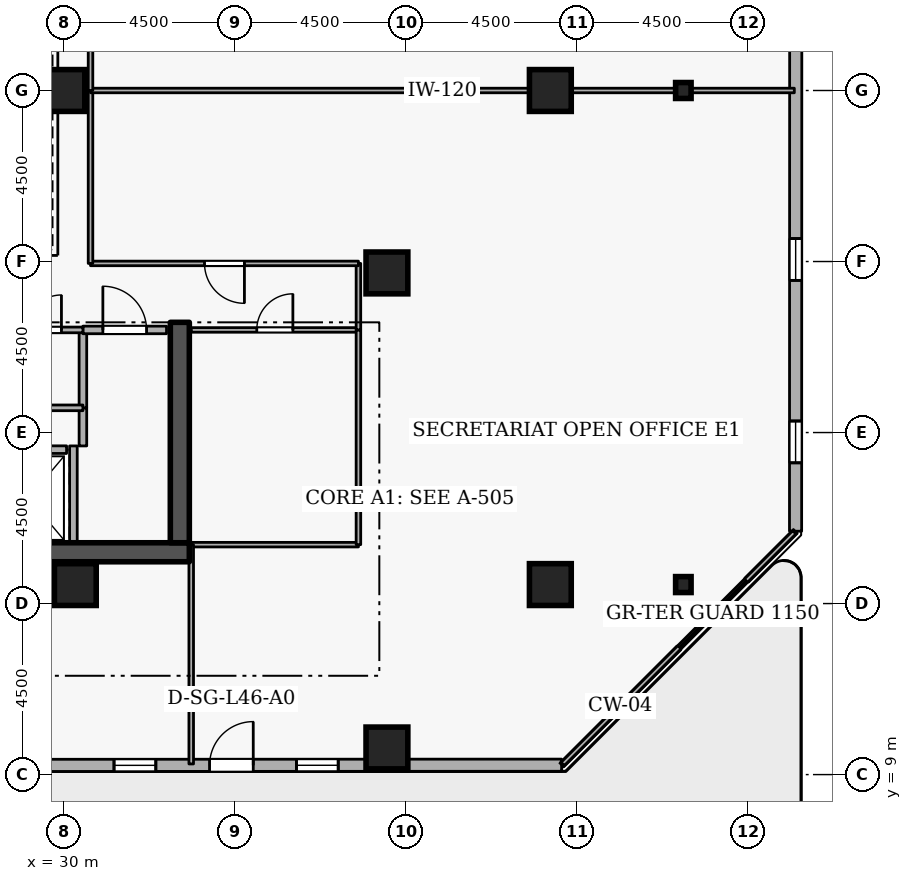
"""IFC4 building model, lengths in metres.
Left out: names, types, materials, properties, quantities, classifications, styles, units other than length and angle.
Written with IfcOpenShell. Run it as: python <this file> out.ifc"""

import sys

from ifc_helpers import new_model, si_unit, direction, frame, frame_2d, origin, origin_2d, place, context, subcontext, project, spatial, rectangle, i_section, extrude, element, fill, save


model = new_model("IFC4")
c1 = context("Model", 3, precision=1e-05, world=origin(), true_north=direction((0.0, 1.0)))
c2 = subcontext(c1, "Body", "Model", "MODEL_VIEW")
j1 = project(units=[si_unit("LENGTHUNIT", "METRE"), si_unit("PLANEANGLEUNIT", "RADIAN")], contexts=[c1])
p1 = place(None, origin())
s1 = spatial("IfcSite", under=j1, at=p1, CompositionType="ELEMENT")
p2 = place(p1, origin())
s2 = spatial("IfcBuilding", under=s1, at=p2, CompositionType="ELEMENT")
p3 = place(p2, frame((0.0, 0.0, 174.3)))
s3 = spatial("IfcBuildingStorey", under=s2, at=p3, CompositionType="ELEMENT", Elevation=174.3)
p4 = place(p3, frame((17.7, 14.85, 0.0), z_axis=(0.0, 0.0, 1.0), x_axis=(1.0, 0.0, 0.0)))
e1 = element("IfcWall", 1, at=p4, inside=s3, PredefinedType="SHEAR", context=c2, shape_type="SweptSolid", body=[
    extrude(rectangle(XDim=15.6, YDim=0.5, at=frame_2d((7.8, 0.0))), origin(), (0.0, 0.0, 1.0), 4.2),
])
p5 = place(p3, frame((33.05, 15.1, 0.0), z_axis=(0.0, 0.0, 1.0), x_axis=(0.0, 1.0, 0.0)))
e2 = element("IfcWall", 2, at=p5, inside=s3, PredefinedType="SHEAR", context=c2, shape_type="SweptSolid", body=[
    extrude(rectangle(XDim=5.8, YDim=0.5, at=frame_2d((2.9, 0.0))), origin(), (0.0, 0.0, 1.0), 4.2),
])
for number, where, z_axis, x_axis in (
    (3, (38.5, 9.7, 0.0), (0.0, 0.0, 1.0), (1.0, 0.0, 0.0)),
    (4, (42.8, 14.0, 0.0), (0.0, 0.0, 1.0), (1.0, 0.0, 0.0)),
    (5, (42.8, 27.0, 0.0), (0.0, 0.0, 1.0), (1.0, 0.0, 0.0)),
    (6, (38.5, 22.2, 0.0), (0.0, 0.0, 1.0), (1.0, 0.0, 0.0)),
    (7, (30.3, 14.0, 0.0), (0.0, 0.0, 1.0), (1.0, 0.0, 0.0)),
    (8, (30.0, 27.0, 0.0), (0.0, 0.0, 1.0), (1.0, 0.0, 0.0)),
):
    element("IfcColumn", number, at=place(p3, frame(where, z_axis=z_axis, x_axis=x_axis)), inside=s3, PredefinedType="COLUMN", context=c2, shape_type="SweptSolid", body=[
        extrude(rectangle(XDim=1.1, YDim=1.1, at=origin_2d()), origin(), (0.0, 0.0, 1.0), 4.2),
    ])
for number, where, z_axis, x_axis in (
    (9, (46.3, 14.0, 0.0), (0.0, 0.0, 1.0), (1.0, 0.0, 0.0)),
    (10, (46.3, 27.0, 0.0), (0.0, 0.0, 1.0), (1.0, 0.0, 0.0)),
):
    element("IfcColumn", number, at=place(p3, frame(where, z_axis=z_axis, x_axis=x_axis)), inside=s3, PredefinedType="COLUMN", context=c2, shape_type="SweptSolid", body=[
        extrude(i_section(OverallWidth=0.407, OverallDepth=0.419, WebThickness=0.031, FlangeThickness=0.049, FilletRadius=0.015, at=origin_2d()), origin(), (0.0, 0.0, 1.0), 4.2),
    ])
p6 = place(p3, frame((10.319, 9.235, 0.0), z_axis=(0.0, 0.0, 1.0), x_axis=(0.999999933399, 0.000364968916, 0.0)))
e11 = element("IfcWall", 11, at=p6, inside=s3, PredefinedType="STANDARD", context=c2, shape_type="SweptSolid", body=[
    extrude(rectangle(XDim=32.778, YDim=0.32, at=frame_2d((16.389, 0.0))), origin(), (0.0, 0.0, 1.0), 3.3),
])
p7 = place(p6, frame((23.514, 0.0, 0.0)))
e12 = element("IfcOpeningElement", 12, at=p7, cuts=e11, PredefinedType="OPENING", context=c2, shape_type="SweptSolid", body=[
    extrude(rectangle(XDim=1.15, YDim=2.1, at=frame_2d((0.575, 1.05))), frame((0.0, 0.17, 0.0), z_axis=(0.0, -1.0, 0.0), x_axis=(1.0, 0.0, 0.0)), (0.0, 0.0, 1.0), 0.34),
])
p8 = place(p6, frame((6.6, 0.0, 0.72)))
e13 = element("IfcOpeningElement", 13, at=p8, cuts=e11, PredefinedType="OPENING", context=c2, shape_type="SweptSolid", body=[
    extrude(rectangle(XDim=1.1, YDim=1.8, at=frame_2d((0.55, 0.9))), frame((0.0, 0.17, 0.0), z_axis=(0.0, -1.0, 0.0), x_axis=(1.0, 0.0, 0.0)), (0.0, 0.0, 1.0), 0.34),
])
p9 = place(p6, frame((11.4, 0.0, 0.72)))
e14 = element("IfcOpeningElement", 14, at=p9, cuts=e11, PredefinedType="OPENING", context=c2, shape_type="SweptSolid", body=[
    extrude(rectangle(XDim=1.1, YDim=1.8, at=frame_2d((0.55, 0.9))), frame((0.0, 0.17, 0.0), z_axis=(0.0, -1.0, 0.0), x_axis=(1.0, 0.0, 0.0)), (0.0, 0.0, 1.0), 0.34),
])
p10 = place(p6, frame((21.0, 0.0, 0.72)))
e15 = element("IfcOpeningElement", 15, at=p10, cuts=e11, PredefinedType="OPENING", context=c2, shape_type="SweptSolid", body=[
    extrude(rectangle(XDim=1.1, YDim=1.8, at=frame_2d((0.55, 0.9))), frame((0.0, 0.17, 0.0), z_axis=(0.0, -1.0, 0.0), x_axis=(1.0, 0.0, 0.0)), (0.0, 0.0, 1.0), 0.34),
])
p11 = place(p6, frame((25.8, 0.0, 0.72)))
e16 = element("IfcOpeningElement", 16, at=p11, cuts=e11, PredefinedType="OPENING", context=c2, shape_type="SweptSolid", body=[
    extrude(rectangle(XDim=1.1, YDim=1.8, at=frame_2d((0.55, 0.9))), frame((0.0, 0.17, 0.0), z_axis=(0.0, -1.0, 0.0), x_axis=(1.0, 0.0, 0.0)), (0.0, 0.0, 1.0), 0.34),
])
p12 = place(p3, frame((49.253, 15.404, 0.0), z_axis=(0.0, 0.0, 1.0), x_axis=(0.000364968916, 0.999999933399, 0.0)))
e17 = element("IfcWall", 17, at=p12, inside=s3, PredefinedType="STANDARD", context=c2, shape_type="SweptSolid", body=[
    extrude(rectangle(XDim=32.778, YDim=0.32, at=frame_2d((16.389, 0.0))), origin(), (0.0, 0.0, 1.0), 3.3),
])
p13 = place(p12, frame((1.8, 0.0, 0.72)))
e18 = element("IfcOpeningElement", 18, at=p13, cuts=e17, PredefinedType="OPENING", context=c2, shape_type="SweptSolid", body=[
    extrude(rectangle(XDim=1.1, YDim=1.8, at=frame_2d((0.55, 0.9))), frame((0.0, 0.17, 0.0), z_axis=(0.0, -1.0, 0.0), x_axis=(1.0, 0.0, 0.0)), (0.0, 0.0, 1.0), 0.34),
])
p14 = place(p12, frame((6.6, 0.0, 0.72)))
e19 = element("IfcOpeningElement", 19, at=p14, cuts=e17, PredefinedType="OPENING", context=c2, shape_type="SweptSolid", body=[
    extrude(rectangle(XDim=1.1, YDim=1.8, at=frame_2d((0.55, 0.9))), frame((0.0, 0.17, 0.0), z_axis=(0.0, -1.0, 0.0), x_axis=(1.0, 0.0, 0.0)), (0.0, 0.0, 1.0), 0.34),
])
p15 = place(p12, frame((16.2, 0.0, 0.72)))
e20 = element("IfcOpeningElement", 20, at=p15, cuts=e17, PredefinedType="OPENING", context=c2, shape_type="SweptSolid", body=[
    extrude(rectangle(XDim=1.1, YDim=1.8, at=frame_2d((0.55, 0.9))), frame((0.0, 0.17, 0.0), z_axis=(0.0, -1.0, 0.0), x_axis=(1.0, 0.0, 0.0)), (0.0, 0.0, 1.0), 0.34),
])
p16 = place(p12, frame((21.0, 0.0, 0.72)))
e21 = element("IfcOpeningElement", 21, at=p16, cuts=e17, PredefinedType="OPENING", context=c2, shape_type="SweptSolid", body=[
    extrude(rectangle(XDim=1.1, YDim=1.8, at=frame_2d((0.55, 0.9))), frame((0.0, 0.17, 0.0), z_axis=(0.0, -1.0, 0.0), x_axis=(1.0, 0.0, 0.0)), (0.0, 0.0, 1.0), 0.34),
])
p17 = place(p12, frame((25.8, 0.0, 0.72)))
e22 = element("IfcOpeningElement", 22, at=p17, cuts=e17, PredefinedType="OPENING", context=c2, shape_type="SweptSolid", body=[
    extrude(rectangle(XDim=1.1, YDim=1.8, at=frame_2d((0.55, 0.9))), frame((0.0, 0.17, 0.0), z_axis=(0.0, -1.0, 0.0), x_axis=(1.0, 0.0, 0.0)), (0.0, 0.0, 1.0), 0.34),
])
p18 = place(p3, frame((28.08, 17.55, 0.0), z_axis=(0.0, 0.0, 1.0), x_axis=(1.0, 0.0, 0.0)))
e23 = element("IfcWall", 23, at=p18, inside=s3, PredefinedType="STANDARD", context=c2, shape_type="SweptSolid", body=[
    extrude(rectangle(XDim=1.99, YDim=0.2, at=frame_2d((0.995, 0.0))), origin(), (0.0, 0.0, 1.0), 3.94),
])
p19 = place(p18, frame((0.485, 0.0, 0.0)))
e24 = element("IfcOpeningElement", 24, at=p19, cuts=e23, PredefinedType="OPENING", context=c2, shape_type="SweptSolid", body=[
    extrude(rectangle(XDim=1.02, YDim=2.06, at=frame_2d((0.51, 1.03))), frame((0.0, 0.11, 0.0), z_axis=(0.0, -1.0, 0.0), x_axis=(1.0, 0.0, 0.0)), (0.0, 0.0, 1.0), 0.22),
])
p20 = place(p3, frame((30.25, 15.112, 0.0), z_axis=(0.0, 0.0, 1.0), x_axis=(0.0, 1.0, 0.0)))
e25 = element("IfcWall", 25, at=p20, inside=s3, PredefinedType="STANDARD", context=c2, shape_type="SweptSolid", body=[
    extrude(rectangle(XDim=2.536, YDim=0.2, at=frame_2d((1.268, 0.0))), origin(), (0.0, 0.0, 1.0), 3.94),
])
p21 = place(p3, frame((30.5, 17.648, 0.0), z_axis=(0.0, 0.0, 1.0), x_axis=(0.0, 1.0, 0.0)))
e26 = element("IfcWall", 26, at=p21, inside=s3, PredefinedType="STANDARD", context=c2, shape_type="SweptSolid", body=[
    extrude(rectangle(XDim=1.002, YDim=0.2, at=frame_2d((0.501, 0.0))), origin(), (0.0, 0.0, 1.0), 3.94),
])
p22 = place(p3, frame((30.5, 18.65, 0.0), z_axis=(0.0, 0.0, 1.0), x_axis=(0.0, 1.0, 0.0)))
e27 = element("IfcWall", 27, at=p22, inside=s3, PredefinedType="STANDARD", context=c2, shape_type="SweptSolid", body=[
    extrude(rectangle(XDim=2.05, YDim=0.2, at=frame_2d((1.025, 0.0))), origin(), (0.0, 0.0, 1.0), 3.94),
])
p23 = place(p3, frame((30.5, 20.7, 0.0), z_axis=(0.0, 0.0, 1.0), x_axis=(1.0, 0.0, 0.0)))
e28 = element("IfcWall", 28, at=p23, inside=s3, PredefinedType="STANDARD", context=c2, shape_type="SweptSolid", body=[
    extrude(rectangle(XDim=2.2, YDim=0.2, at=frame_2d((1.1, 0.0))), origin(), (0.0, 0.0, 1.0), 3.94),
])
p24 = place(p23, frame((0.525, 0.0, 0.0)))
e29 = element("IfcOpeningElement", 29, at=p24, cuts=e28, PredefinedType="OPENING", context=c2, shape_type="SweptSolid", body=[
    extrude(rectangle(XDim=1.15, YDim=2.1, at=frame_2d((0.575, 1.05))), frame((0.0, 0.11, 0.0), z_axis=(0.0, -1.0, 0.0), x_axis=(1.0, 0.0, 0.0)), (0.0, 0.0, 1.0), 0.22),
])
p25 = place(p3, frame((30.5, 18.65, 0.0), z_axis=(0.0, 0.0, 1.0), x_axis=(-1.0, 0.0, 0.0)))
e30 = element("IfcWall", 30, at=p25, inside=s3, PredefinedType="PARTITIONING", context=c2, shape_type="SweptSolid", body=[
    extrude(rectangle(XDim=2.05, YDim=0.15, at=frame_2d((1.025, 0.0))), origin(), (0.0, 0.0, 1.0), 3.94),
])
p26 = place(p3, frame((28.45, 20.7, 0.0), z_axis=(0.0, 0.0, 1.0), x_axis=(1.0, 0.0, 0.0)))
e31 = element("IfcWall", 31, at=p26, inside=s3, PredefinedType="PARTITIONING", context=c2, shape_type="SweptSolid", body=[
    extrude(rectangle(XDim=2.05, YDim=0.15, at=frame_2d((1.025, 0.0))), origin(), (0.0, 0.0, 1.0), 3.94),
])
p27 = place(p26, frame((0.565, 0.0, 0.0)))
e32 = element("IfcOpeningElement", 32, at=p27, cuts=e31, PredefinedType="OPENING", context=c2, shape_type="SweptSolid", body=[
    extrude(rectangle(XDim=0.92, YDim=2.08, at=frame_2d((0.46, 1.04))), frame((0.0, 0.085, 0.0), z_axis=(0.0, -1.0, 0.0), x_axis=(1.0, 0.0, 0.0)), (0.0, 0.0, 1.0), 0.17),
])
p28 = place(p3, frame((37.75, 15.05, 0.0), z_axis=(0.0, 0.0, 1.0), x_axis=(-1.0, 0.0, 0.0)))
e33 = element("IfcWall", 33, at=p28, inside=s3, PredefinedType="PARTITIONING", context=c2, shape_type="SweptSolid", body=[
    extrude(rectangle(XDim=4.4, YDim=0.12, at=frame_2d((2.2, 0.0))), origin(), (0.0, 0.0, 1.0), 3.94),
])
p29 = place(p3, frame((33.35, 20.7, 0.0), z_axis=(0.0, 0.0, 1.0), x_axis=(1.0, 0.0, 0.0)))
e34 = element("IfcWall", 34, at=p29, inside=s3, PredefinedType="PARTITIONING", context=c2, shape_type="SweptSolid", body=[
    extrude(rectangle(XDim=4.4, YDim=0.12, at=frame_2d((2.2, 0.0))), origin(), (0.0, 0.0, 1.0), 3.94),
])
p30 = place(p29, frame((1.725, 0.0, 0.0)))
e35 = element("IfcOpeningElement", 35, at=p30, cuts=e34, PredefinedType="OPENING", context=c2, shape_type="SweptSolid", body=[
    extrude(rectangle(XDim=0.95, YDim=2.1, at=frame_2d((0.475, 1.05))), frame((0.0, 0.07, 0.0), z_axis=(0.0, -1.0, 0.0), x_axis=(1.0, 0.0, 0.0)), (0.0, 0.0, 1.0), 0.14),
])
p31 = place(p3, frame((37.75, 20.7, 0.0), z_axis=(0.0, 0.0, 1.0), x_axis=(0.0, -1.0, 0.0)))
e36 = element("IfcWall", 36, at=p31, inside=s3, PredefinedType="PARTITIONING", context=c2, shape_type="SweptSolid", body=[
    extrude(rectangle(XDim=5.65, YDim=0.12, at=frame_2d((2.825, 0.0))), origin(), (0.0, 0.0, 1.0), 3.94),
])
p32 = place(p3, frame((37.75, 20.7, 0.0), z_axis=(0.0, 0.0, 1.0), x_axis=(0.0, 1.0, 0.0)))
e37 = element("IfcWall", 37, at=p32, inside=s3, PredefinedType="PARTITIONING", context=c2, shape_type="SweptSolid", body=[
    extrude(rectangle(XDim=1.75, YDim=0.12, at=frame_2d((0.875, 0.0))), origin(), (0.0, 0.0, 1.0), 3.94),
])
p33 = place(p3, frame((37.75, 22.45, 0.0), z_axis=(0.0, 0.0, 1.0), x_axis=(-1.0, 0.0, 0.0)))
e38 = element("IfcWall", 38, at=p33, inside=s3, PredefinedType="PARTITIONING", context=c2, shape_type="SweptSolid", body=[
    extrude(rectangle(XDim=7.05, YDim=0.12, at=frame_2d((3.525, 0.0))), origin(), (0.0, 0.0, 1.0), 3.94),
])
p34 = place(p33, frame((3.0, 0.0, 0.0)))
e39 = element("IfcOpeningElement", 39, at=p34, cuts=e38, PredefinedType="OPENING", context=c2, shape_type="SweptSolid", body=[
    extrude(rectangle(XDim=1.05, YDim=2.1, at=frame_2d((0.525, 1.05))), frame((0.0, 0.07, 0.0), z_axis=(0.0, -1.0, 0.0), x_axis=(1.0, 0.0, 0.0)), (0.0, 0.0, 1.0), 0.14),
])
p35 = place(p3, frame((30.7, 22.45, 0.0), z_axis=(0.0, 0.0, 1.0), x_axis=(0.0, 1.0, 0.0)))
e40 = element("IfcWall", 40, at=p35, inside=s3, PredefinedType="PARTITIONING", context=c2, shape_type="SweptSolid", body=[
    extrude(rectangle(XDim=4.55, YDim=0.12, at=frame_2d((2.275, 0.0))), origin(), (0.0, 0.0, 1.0), 3.94),
])
p36 = place(p3, frame((30.7, 27.0, 0.0), z_axis=(0.0, 0.0, 1.0), x_axis=(1.0, 0.0, 0.0)))
e41 = element("IfcWall", 41, at=p36, inside=s3, PredefinedType="PARTITIONING", context=c2, shape_type="SweptSolid", body=[
    extrude(rectangle(XDim=18.52, YDim=0.12, at=frame_2d((9.26, 0.0))), origin(), (0.0, 0.0, 1.0), 3.532),
])
p37 = place(p3, frame((49.22, 15.375, 0.0), z_axis=(0.0, 0.0, 1.0), x_axis=(-0.707106781187, -0.707106781187, 0.0)))
e42 = element("IfcWall", 42, at=p37, inside=s3, PredefinedType="PARTITIONING", context=c2, shape_type="SweptSolid", body=[
    extrude(rectangle(XDim=8.619, YDim=0.12, at=frame_2d((4.31, 0.0))), origin(), (0.0, 0.0, 1.0), 3.94),
])
p38 = place(p3, frame((33.35, 9.28, 0.0), z_axis=(0.0, 0.0, 1.0), x_axis=(0.0, 1.0, 0.0)))
e43 = element("IfcWall", 43, at=p38, inside=s3, PredefinedType="PARTITIONING", context=c2, shape_type="SweptSolid", body=[
    extrude(rectangle(XDim=5.77, YDim=0.12, at=frame_2d((2.885, 0.0))), origin(), (0.0, 0.0, 1.0), 3.145),
])
p39 = place(p3, frame((30.7, 27.0, 0.0), z_axis=(0.0, 0.0, 1.0), x_axis=(0.0, 1.0, 0.0)))
e44 = element("IfcWall", 44, at=p39, inside=s3, PredefinedType="PARTITIONING", context=c2, shape_type="SweptSolid", body=[
    extrude(rectangle(XDim=4.55, YDim=0.12, at=frame_2d((2.275, 0.0))), origin(), (0.0, 0.0, 1.0), 3.94),
])
p40 = place(p7, origin())
e45 = element("IfcDoor", 45, at=p40, inside=s3, OperationType="SINGLE_SWING_RIGHT", PredefinedType="DOOR", context=c2, shape_type="SweptSolid", body=[
    extrude(rectangle(XDim=1.15, YDim=2.1, at=frame_2d((0.575, 1.05))), frame((0.0, 0.025, 0.0), z_axis=(0.0, -1.0, 0.0), x_axis=(1.0, 0.0, 0.0)), (0.0, 0.0, 1.0), 0.05),
])
fill(e12, e45)
p41 = place(p10, origin())
e46 = element("IfcWindow", 46, at=p41, inside=s3, PartitioningType="SINGLE_PANEL", PredefinedType="WINDOW", context=c2, shape_type="SweptSolid", body=[
    extrude(rectangle(XDim=1.1, YDim=1.8, at=frame_2d((0.55, 0.9))), frame((0.0, 0.03, 0.0), z_axis=(0.0, -1.0, 0.0), x_axis=(1.0, 0.0, 0.0)), (0.0, 0.0, 1.0), 0.06),
])
fill(e15, e46)
p42 = place(p11, origin())
e47 = element("IfcWindow", 47, at=p42, inside=s3, PartitioningType="SINGLE_PANEL", PredefinedType="WINDOW", context=c2, shape_type="SweptSolid", body=[
    extrude(rectangle(XDim=1.1, YDim=1.8, at=frame_2d((0.55, 0.9))), frame((0.0, 0.03, 0.0), z_axis=(0.0, -1.0, 0.0), x_axis=(1.0, 0.0, 0.0)), (0.0, 0.0, 1.0), 0.06),
])
fill(e16, e47)
p43 = place(p13, origin())
e48 = element("IfcWindow", 48, at=p43, inside=s3, PartitioningType="SINGLE_PANEL", PredefinedType="WINDOW", context=c2, shape_type="SweptSolid", body=[
    extrude(rectangle(XDim=1.1, YDim=1.8, at=frame_2d((0.55, 0.9))), frame((0.0, 0.03, 0.0), z_axis=(0.0, -1.0, 0.0), x_axis=(1.0, 0.0, 0.0)), (0.0, 0.0, 1.0), 0.06),
])
fill(e18, e48)
p44 = place(p14, origin())
e49 = element("IfcWindow", 49, at=p44, inside=s3, PartitioningType="SINGLE_PANEL", PredefinedType="WINDOW", context=c2, shape_type="SweptSolid", body=[
    extrude(rectangle(XDim=1.1, YDim=1.8, at=frame_2d((0.55, 0.9))), frame((0.0, 0.03, 0.0), z_axis=(0.0, -1.0, 0.0), x_axis=(1.0, 0.0, 0.0)), (0.0, 0.0, 1.0), 0.06),
])
fill(e19, e49)
p45 = place(p27, origin())
e50 = element("IfcDoor", 50, at=p45, inside=s3, OperationType="SINGLE_SWING_RIGHT", PredefinedType="DOOR", context=c2, shape_type="SweptSolid", body=[
    extrude(rectangle(XDim=0.92, YDim=2.08, at=frame_2d((0.46, 1.04))), frame((0.0, 0.025, 0.0), z_axis=(0.0, -1.0, 0.0), x_axis=(1.0, 0.0, 0.0)), (0.0, 0.0, 1.0), 0.05),
])
fill(e32, e50)
p46 = place(p24, origin())
e51 = element("IfcDoor", 51, at=p46, inside=s3, OperationType="SINGLE_SWING_LEFT", PredefinedType="DOOR", context=c2, shape_type="SweptSolid", body=[
    extrude(rectangle(XDim=1.15, YDim=2.1, at=frame_2d((0.575, 1.05))), frame((0.0, 0.025, 0.0), z_axis=(0.0, -1.0, 0.0), x_axis=(1.0, 0.0, 0.0)), (0.0, 0.0, 1.0), 0.05),
])
fill(e29, e51)
p47 = place(p30, origin())
e52 = element("IfcDoor", 52, at=p47, inside=s3, OperationType="SINGLE_SWING_RIGHT", PredefinedType="DOOR", context=c2, shape_type="SweptSolid", body=[
    extrude(rectangle(XDim=0.95, YDim=2.1, at=frame_2d((0.475, 1.05))), frame((0.0, 0.025, 0.0), z_axis=(0.0, -1.0, 0.0), x_axis=(1.0, 0.0, 0.0)), (0.0, 0.0, 1.0), 0.05),
])
fill(e35, e52)
p48 = place(p34, origin())
e53 = element("IfcDoor", 53, at=p48, inside=s3, OperationType="SINGLE_SWING_LEFT", PredefinedType="DOOR", context=c2, shape_type="SweptSolid", body=[
    extrude(rectangle(XDim=1.05, YDim=2.1, at=frame_2d((0.525, 1.05))), frame((0.0, 0.025, 0.0), z_axis=(0.0, -1.0, 0.0), x_axis=(1.0, 0.0, 0.0)), (0.0, 0.0, 1.0), 0.05),
])
fill(e39, e53)
save(model, sys.argv[1])
